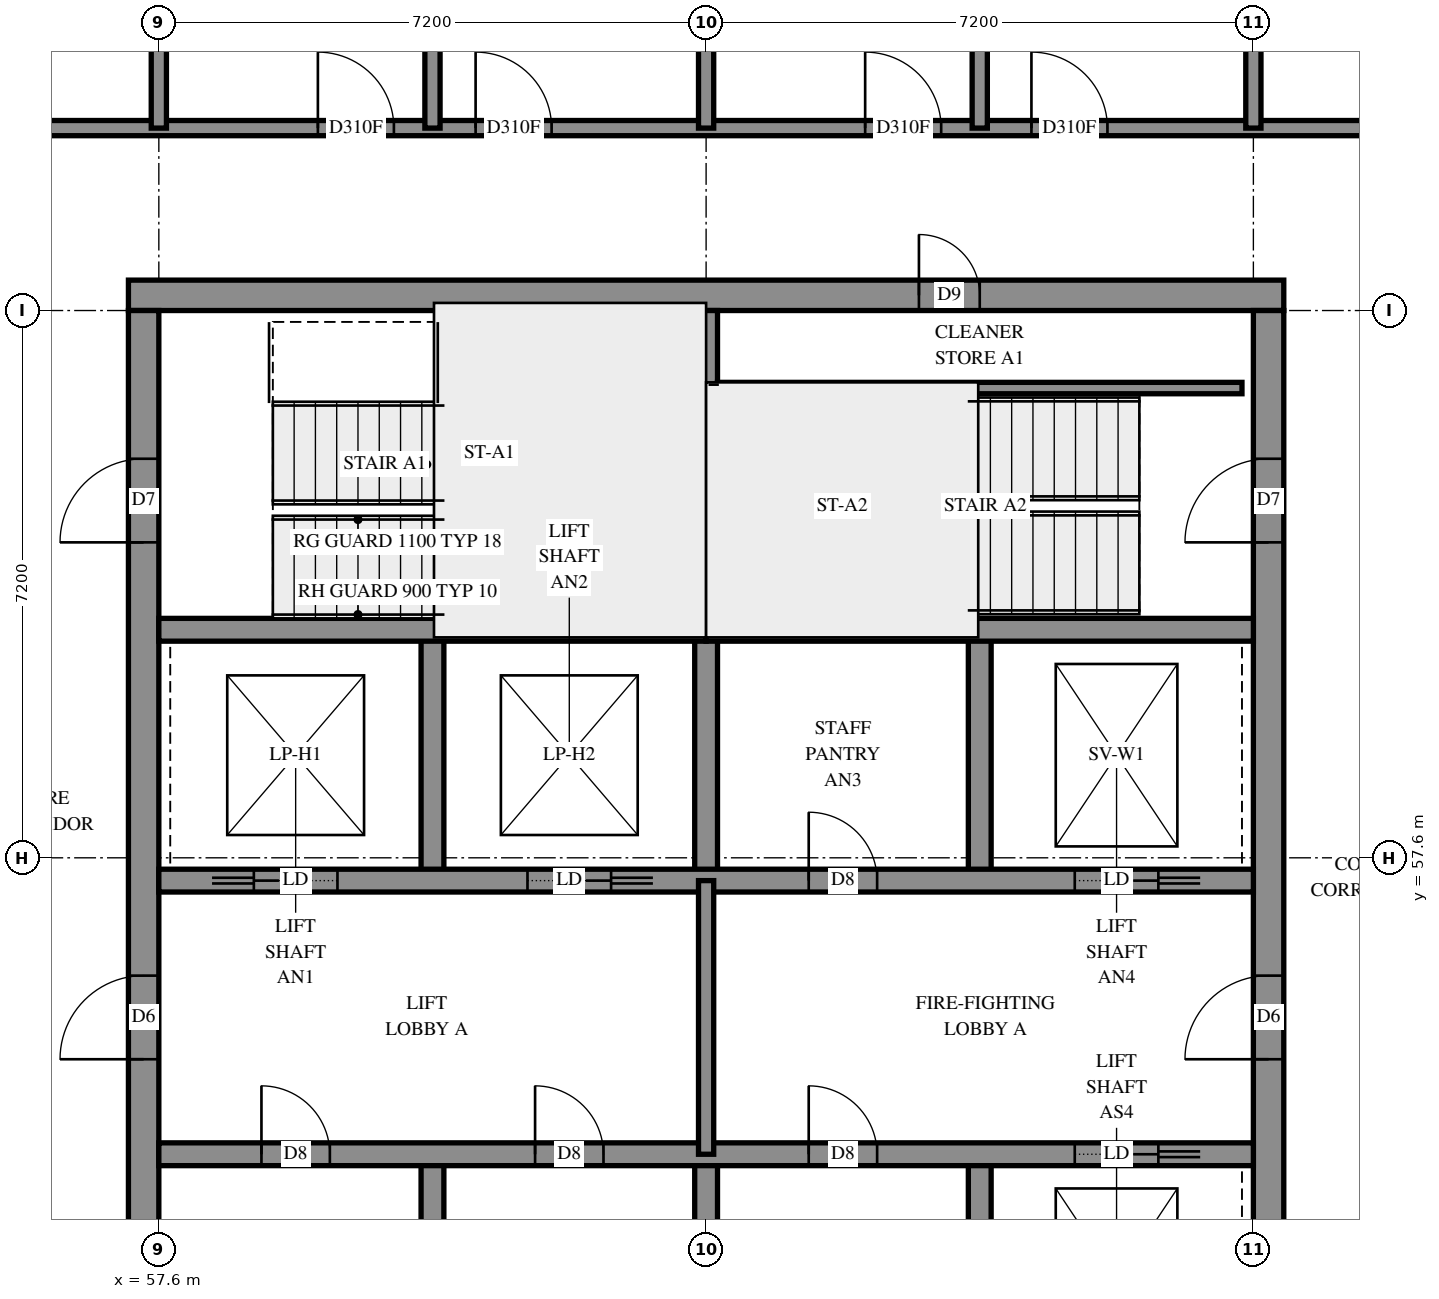
"""IFC4 building model, lengths in metres.
Left out: names, types, materials, properties, quantities, classifications, styles, units other than length and angle.
Written with IfcOpenShell. Run it as: python <this file> out.ifc"""

import sys

from ifc_helpers import new_model, si_unit, direction, frame, frame_2d, origin, place, context, subcontext, project, spatial, rectangle, extrude, element, fill, save


model = new_model("IFC4")
c1 = context("Model", 3, precision=1e-05, world=origin(), true_north=direction((0.0, 1.0)))
c2 = subcontext(c1, "Body", "Model", "MODEL_VIEW")
j1 = project(units=[si_unit("LENGTHUNIT", "METRE"), si_unit("PLANEANGLEUNIT", "RADIAN")], contexts=[c1])
p1 = place(None, origin())
s1 = spatial("IfcSite", under=j1, at=p1, CompositionType="ELEMENT")
p2 = place(p1, origin())
s2 = spatial("IfcBuilding", under=s1, at=p2, CompositionType="ELEMENT")
p3 = place(p2, frame((0.0, 0.0, 264.2)))
s3 = spatial("IfcBuildingStorey", under=s2, at=p3, CompositionType="ELEMENT", Elevation=264.2)
p4 = place(p3, frame((57.2, 65.0, -0.3), z_axis=(0.0, 0.0, 1.0), x_axis=(1.0, 0.0, 0.0)))
e1 = element("IfcWall", 1, at=p4, inside=s3, PredefinedType="SHEAR", context=c2, shape_type="SweptSolid", body=[
    extrude(rectangle(XDim=15.2, YDim=0.4, at=frame_2d((7.6, 0.0))), origin(), (0.0, 0.0, 1.0), 2.7),
])
p5 = place(p4, frame((10.4, 0.0, 0.3)))
e2 = element("IfcOpeningElement", 2, at=p5, cuts=e1, PredefinedType="OPENING", context=c2, shape_type="SweptSolid", body=[
    extrude(rectangle(XDim=0.8, YDim=2.1, at=frame_2d((0.4, 1.05))), frame((0.0, 0.21, 0.0), z_axis=(0.0, -1.0, 0.0), x_axis=(1.0, 0.0, 0.0)), (0.0, 0.0, 1.0), 0.42),
])
p6 = place(p3, frame((57.4, 50.4, -0.3), z_axis=(0.0, 0.0, 1.0), x_axis=(0.0, 1.0, 0.0)))
e3 = element("IfcWall", 3, at=p6, inside=s3, PredefinedType="SHEAR", context=c2, shape_type="SweptSolid", body=[
    extrude(rectangle(XDim=14.4, YDim=0.4, at=frame_2d((7.2, 0.0))), origin(), (0.0, 0.0, 1.0), 2.7),
])
p7 = place(p6, frame((4.55, 0.0, 0.3)))
e4 = element("IfcOpeningElement", 4, at=p7, cuts=e3, PredefinedType="OPENING", context=c2, shape_type="SweptSolid", body=[
    extrude(rectangle(XDim=1.1, YDim=2.1, at=frame_2d((0.55, 1.05))), frame((0.0, 0.21, 0.0), z_axis=(0.0, -1.0, 0.0), x_axis=(1.0, 0.0, 0.0)), (0.0, 0.0, 1.0), 0.42),
])
p8 = place(p6, frame((11.35, 0.0, 0.3)))
e5 = element("IfcOpeningElement", 5, at=p8, cuts=e3, PredefinedType="OPENING", context=c2, shape_type="SweptSolid", body=[
    extrude(rectangle(XDim=1.1, YDim=2.1, at=frame_2d((0.55, 1.05))), frame((0.0, 0.21, 0.0), z_axis=(0.0, -1.0, 0.0), x_axis=(1.0, 0.0, 0.0)), (0.0, 0.0, 1.0), 0.42),
])
p9 = place(p3, frame((72.2, 50.4, -0.3), z_axis=(0.0, 0.0, 1.0), x_axis=(0.0, 1.0, 0.0)))
e6 = element("IfcWall", 6, at=p9, inside=s3, PredefinedType="SHEAR", context=c2, shape_type="SweptSolid", body=[
    extrude(rectangle(XDim=14.4, YDim=0.4, at=frame_2d((7.2, 0.0))), origin(), (0.0, 0.0, 1.0), 2.7),
])
p10 = place(p9, frame((4.55, 0.0, 0.3)))
e7 = element("IfcOpeningElement", 7, at=p10, cuts=e6, PredefinedType="OPENING", context=c2, shape_type="SweptSolid", body=[
    extrude(rectangle(XDim=1.1, YDim=2.1, at=frame_2d((0.55, 1.05))), frame((0.0, 0.21, 0.0), z_axis=(0.0, -1.0, 0.0), x_axis=(1.0, 0.0, 0.0)), (0.0, 0.0, 1.0), 0.42),
])
p11 = place(p9, frame((11.35, 0.0, 0.3)))
e8 = element("IfcOpeningElement", 8, at=p11, cuts=e6, PredefinedType="OPENING", context=c2, shape_type="SweptSolid", body=[
    extrude(rectangle(XDim=1.1, YDim=2.1, at=frame_2d((0.55, 1.05))), frame((0.0, 0.21, 0.0), z_axis=(0.0, -1.0, 0.0), x_axis=(1.0, 0.0, 0.0)), (0.0, 0.0, 1.0), 0.42),
])
for number, where, z_axis, x_axis in (
    (9, (61.2, 50.4, 0.0), (0.0, 0.0, 1.0), (0.0, 1.0, 0.0)),
    (10, (61.2, 57.3, 0.0), (0.0, 0.0, 1.0), (0.0, 1.0, 0.0)),
    (11, (64.8, 50.4, 0.0), (0.0, 0.0, 1.0), (0.0, 1.0, 0.0)),
    (12, (64.8, 57.3, 0.0), (0.0, 0.0, 1.0), (0.0, 1.0, 0.0)),
    (13, (68.4, 50.4, 0.0), (0.0, 0.0, 1.0), (0.0, 1.0, 0.0)),
    (14, (68.4, 57.3, 0.0), (0.0, 0.0, 1.0), (0.0, 1.0, 0.0)),
):
    element("IfcWall", number, at=place(p3, frame(where, z_axis=z_axis, x_axis=x_axis)), inside=s3, PredefinedType="SOLIDWALL", context=c2, shape_type="SweptSolid", body=[
        extrude(rectangle(XDim=3.3, YDim=0.3, at=frame_2d((1.65, 0.0))), origin(), (0.0, 0.0, 1.0), 3.1),
    ])
p12 = place(p3, frame((57.6, 53.7, 0.0), z_axis=(0.0, 0.0, 1.0), x_axis=(1.0, 0.0, 0.0)))
e15 = element("IfcWall", 15, at=p12, inside=s3, PredefinedType="SOLIDWALL", context=c2, shape_type="SweptSolid", body=[
    extrude(rectangle(XDim=14.4, YDim=0.3, at=frame_2d((7.2, 0.0))), origin(), (0.0, 0.0, 1.0), 3.1),
])
p13 = place(p12, frame((1.35, 0.0, 0.0)))
e16 = element("IfcOpeningElement", 16, at=p13, cuts=e15, PredefinedType="OPENING", context=c2, shape_type="SweptSolid", body=[
    extrude(rectangle(XDim=0.9, YDim=2.1, at=frame_2d((0.45, 1.05))), frame((0.0, 0.16, 0.0), z_axis=(0.0, -1.0, 0.0), x_axis=(1.0, 0.0, 0.0)), (0.0, 0.0, 1.0), 0.32),
])
p14 = place(p12, frame((4.95, 0.0, 0.0)))
e17 = element("IfcOpeningElement", 17, at=p14, cuts=e15, PredefinedType="OPENING", context=c2, shape_type="SweptSolid", body=[
    extrude(rectangle(XDim=0.9, YDim=2.1, at=frame_2d((0.45, 1.05))), frame((0.0, 0.16, 0.0), z_axis=(0.0, -1.0, 0.0), x_axis=(1.0, 0.0, 0.0)), (0.0, 0.0, 1.0), 0.32),
])
p15 = place(p12, frame((8.55, 0.0, 0.0)))
e18 = element("IfcOpeningElement", 18, at=p15, cuts=e15, PredefinedType="OPENING", context=c2, shape_type="SweptSolid", body=[
    extrude(rectangle(XDim=0.9, YDim=2.1, at=frame_2d((0.45, 1.05))), frame((0.0, 0.16, 0.0), z_axis=(0.0, -1.0, 0.0), x_axis=(1.0, 0.0, 0.0)), (0.0, 0.0, 1.0), 0.32),
])
p16 = place(p12, frame((12.05, 0.0, 0.0)))
e19 = element("IfcOpeningElement", 19, at=p16, cuts=e15, PredefinedType="OPENING", context=c2, shape_type="SweptSolid", body=[
    extrude(rectangle(XDim=1.1, YDim=2.1, at=frame_2d((0.55, 1.05))), frame((0.0, 0.16, 0.0), z_axis=(0.0, -1.0, 0.0), x_axis=(1.0, 0.0, 0.0)), (0.0, 0.0, 1.0), 0.32),
])
p17 = place(p3, frame((57.6, 57.3, 0.0), z_axis=(0.0, 0.0, 1.0), x_axis=(1.0, 0.0, 0.0)))
e20 = element("IfcWall", 20, at=p17, inside=s3, PredefinedType="SOLIDWALL", context=c2, shape_type="SweptSolid", body=[
    extrude(rectangle(XDim=14.4, YDim=0.3, at=frame_2d((7.2, 0.0))), origin(), (0.0, 0.0, 1.0), 3.1),
])
p18 = place(p17, frame((8.55, 0.0, 0.0)))
e21 = element("IfcOpeningElement", 21, at=p18, cuts=e20, PredefinedType="OPENING", context=c2, shape_type="SweptSolid", body=[
    extrude(rectangle(XDim=0.9, YDim=2.1, at=frame_2d((0.45, 1.05))), frame((0.0, 0.16, 0.0), z_axis=(0.0, -1.0, 0.0), x_axis=(1.0, 0.0, 0.0)), (0.0, 0.0, 1.0), 0.32),
])
p19 = place(p17, frame((1.25, 0.0, 0.0)))
e22 = element("IfcOpeningElement", 22, at=p19, cuts=e20, PredefinedType="OPENING", context=c2, shape_type="SweptSolid", body=[
    extrude(rectangle(XDim=1.1, YDim=2.1, at=frame_2d((0.55, 1.05))), frame((0.0, 0.16, 0.0), z_axis=(0.0, -1.0, 0.0), x_axis=(1.0, 0.0, 0.0)), (0.0, 0.0, 1.0), 0.32),
])
p20 = place(p17, frame((4.85, 0.0, 0.0)))
e23 = element("IfcOpeningElement", 23, at=p20, cuts=e20, PredefinedType="OPENING", context=c2, shape_type="SweptSolid", body=[
    extrude(rectangle(XDim=1.1, YDim=2.1, at=frame_2d((0.55, 1.05))), frame((0.0, 0.16, 0.0), z_axis=(0.0, -1.0, 0.0), x_axis=(1.0, 0.0, 0.0)), (0.0, 0.0, 1.0), 0.32),
])
p21 = place(p17, frame((12.05, 0.0, 0.0)))
e24 = element("IfcOpeningElement", 24, at=p21, cuts=e20, PredefinedType="OPENING", context=c2, shape_type="SweptSolid", body=[
    extrude(rectangle(XDim=1.1, YDim=2.1, at=frame_2d((0.55, 1.05))), frame((0.0, 0.16, 0.0), z_axis=(0.0, -1.0, 0.0), x_axis=(1.0, 0.0, 0.0)), (0.0, 0.0, 1.0), 0.32),
])
for number, where, z_axis, x_axis in (
    (25, (57.6, 60.6, 0.0), (0.0, 0.0, 1.0), (1.0, 0.0, 0.0)),
    (26, (64.8, 60.6, 0.0), (0.0, 0.0, 1.0), (1.0, 0.0, 0.0)),
):
    element("IfcWall", number, at=place(p3, frame(where, z_axis=z_axis, x_axis=x_axis)), inside=s3, PredefinedType="SOLIDWALL", context=c2, shape_type="SweptSolid", body=[
        extrude(rectangle(XDim=7.2, YDim=0.3, at=frame_2d((3.6, 0.0))), origin(), (0.0, 0.0, 1.0), 3.1),
    ])
p22 = place(p3, frame((64.8, 60.6, 0.0), z_axis=(0.0, 0.0, 1.0), x_axis=(0.0, 1.0, 0.0)))
e27 = element("IfcWall", 27, at=p22, inside=s3, PredefinedType="SOLIDWALL", context=c2, shape_type="SweptSolid", body=[
    extrude(rectangle(XDim=4.2, YDim=0.3, at=frame_2d((2.1, 0.0))), origin(), (0.0, 0.0, 1.0), 3.1),
])
p23 = place(p3, frame((64.95, 63.78, 0.0), z_axis=(0.0, 0.0, 1.0), x_axis=(1.0, 0.0, 0.0)))
e28 = element("IfcWall", 28, at=p23, inside=s3, PredefinedType="PARTITIONING", context=c2, shape_type="SweptSolid", body=[
    extrude(rectangle(XDim=6.9, YDim=0.15, at=frame_2d((3.45, 0.0))), origin(), (0.0, 0.0, 1.0), 3.1),
])
p24 = place(p3, frame((64.8, 53.7, 0.0), z_axis=(0.0, 0.0, 1.0), x_axis=(0.0, 1.0, 0.0)))
e29 = element("IfcWall", 29, at=p24, inside=s3, PredefinedType="PARTITIONING", context=c2, shape_type="SweptSolid", body=[
    extrude(rectangle(XDim=3.6, YDim=0.2, at=frame_2d((1.8, 0.0))), origin(), (0.0, 0.0, 1.0), 3.1),
])
p25 = place(p3, frame((55.2, 67.2, 0.0), z_axis=(0.0, 0.0, 1.0), x_axis=(1.0, 0.0, 0.0)))
e30 = element("IfcWall", 30, at=p25, inside=s3, PredefinedType="PARTITIONING", context=c2, shape_type="SweptSolid", body=[
    extrude(rectangle(XDim=19.2, YDim=0.2, at=frame_2d((9.6, 0.0))), origin(), (0.0, 0.0, 1.0), 3.1),
])
p26 = place(p25, frame((4.492, 0.0, 0.0)))
e31 = element("IfcOpeningElement", 31, at=p26, cuts=e30, PredefinedType="OPENING", context=c2, shape_type="SweptSolid", body=[
    extrude(rectangle(XDim=1.0, YDim=2.1, at=frame_2d((0.5, 1.05))), frame((0.0, 0.11, 0.0), z_axis=(0.0, -1.0, 0.0), x_axis=(1.0, 0.0, 0.0)), (0.0, 0.0, 1.0), 0.22),
])
p27 = place(p25, frame((6.567, 0.0, 0.0)))
e32 = element("IfcOpeningElement", 32, at=p27, cuts=e30, PredefinedType="OPENING", context=c2, shape_type="SweptSolid", body=[
    extrude(rectangle(XDim=1.0, YDim=2.1, at=frame_2d((0.5, 1.05))), frame((0.0, 0.11, 0.0), z_axis=(0.0, -1.0, 0.0), x_axis=(1.0, 0.0, 0.0)), (0.0, 0.0, 1.0), 0.22),
])
p28 = place(p25, frame((11.693, 0.0, 0.0)))
e33 = element("IfcOpeningElement", 33, at=p28, cuts=e30, PredefinedType="OPENING", context=c2, shape_type="SweptSolid", body=[
    extrude(rectangle(XDim=1.0, YDim=2.1, at=frame_2d((0.5, 1.05))), frame((0.0, 0.11, 0.0), z_axis=(0.0, -1.0, 0.0), x_axis=(1.0, 0.0, 0.0)), (0.0, 0.0, 1.0), 0.22),
])
p29 = place(p25, frame((13.88, 0.0, 0.0)))
e34 = element("IfcOpeningElement", 34, at=p29, cuts=e30, PredefinedType="OPENING", context=c2, shape_type="SweptSolid", body=[
    extrude(rectangle(XDim=1.0, YDim=2.1, at=frame_2d((0.5, 1.05))), frame((0.0, 0.11, 0.0), z_axis=(0.0, -1.0, 0.0), x_axis=(1.0, 0.0, 0.0)), (0.0, 0.0, 1.0), 0.22),
])
p30 = place(p3, frame((68.4, 67.2, 0.0), z_axis=(0.0, 0.0, 1.0), x_axis=(0.0, 1.0, 0.0)))
e35 = element("IfcWall", 35, at=p30, inside=s3, PredefinedType="PARTITIONING", context=c2, shape_type="SweptSolid", body=[
    extrude(rectangle(XDim=5.578, YDim=0.2, at=frame_2d((2.789, 0.0))), origin(), (0.0, 0.0, 1.0), 3.1),
])
p31 = place(p3, frame((61.2, 67.2, 0.0), z_axis=(0.0, 0.0, 1.0), x_axis=(0.0, 1.0, 0.0)))
e36 = element("IfcWall", 36, at=p31, inside=s3, PredefinedType="PARTITIONING", context=c2, shape_type="SweptSolid", body=[
    extrude(rectangle(XDim=5.572, YDim=0.2, at=frame_2d((2.786, 0.0))), origin(), (0.0, 0.0, 1.0), 3.1),
])
for number, where, z_axis, x_axis in (
    (37, (57.6, 67.2, 0.0), (0.0, 0.0, 1.0), (0.0, 1.0, 0.0)),
    (38, (64.8, 67.2, 0.0), (0.0, 0.0, 1.0), (0.0, 1.0, 0.0)),
):
    element("IfcWall", number, at=place(p3, frame(where, z_axis=z_axis, x_axis=x_axis)), inside=s3, PredefinedType="PARTITIONING", context=c2, shape_type="SweptSolid", body=[
        extrude(rectangle(XDim=4.45, YDim=0.2, at=frame_2d((2.225, 0.0))), origin(), (0.0, 0.0, 1.0), 3.1),
    ])
p32 = place(p3, frame((72.0, 67.2, 0.0), z_axis=(0.0, 0.0, 1.0), x_axis=(0.0, 1.0, 0.0)))
e39 = element("IfcWall", 39, at=p32, inside=s3, PredefinedType="PARTITIONING", context=c2, shape_type="SweptSolid", body=[
    extrude(rectangle(XDim=4.346, YDim=0.2, at=frame_2d((2.173, 0.0))), origin(), (0.0, 0.0, 1.0), 3.1),
])
p33 = place(p5, origin())
e40 = element("IfcDoor", 40, at=p33, inside=s3, OperationType="SINGLE_SWING_RIGHT", PredefinedType="DOOR", context=c2, shape_type="SweptSolid", body=[
    extrude(rectangle(XDim=0.8, YDim=2.1, at=frame_2d((0.4, 1.05))), frame((0.0, 0.025, 0.0), z_axis=(0.0, -1.0, 0.0), x_axis=(1.0, 0.0, 0.0)), (0.0, 0.0, 1.0), 0.05),
])
fill(e2, e40)
p34 = place(p7, origin())
e41 = element("IfcDoor", 41, at=p34, inside=s3, OperationType="DOUBLE_DOOR_SINGLE_SWING", PredefinedType="DOOR", context=c2, shape_type="SweptSolid", body=[
    extrude(rectangle(XDim=1.1, YDim=2.1, at=frame_2d((0.55, 1.05))), frame((0.0, 0.025, 0.0), z_axis=(0.0, -1.0, 0.0), x_axis=(1.0, 0.0, 0.0)), (0.0, 0.0, 1.0), 0.05),
])
fill(e4, e41)
p35 = place(p10, origin())
e42 = element("IfcDoor", 42, at=p35, inside=s3, OperationType="DOUBLE_DOOR_SINGLE_SWING", PredefinedType="DOOR", context=c2, shape_type="SweptSolid", body=[
    extrude(rectangle(XDim=1.1, YDim=2.1, at=frame_2d((0.55, 1.05))), frame((0.0, 0.025, 0.0), z_axis=(0.0, -1.0, 0.0), x_axis=(1.0, 0.0, 0.0)), (0.0, 0.0, 1.0), 0.05),
])
fill(e7, e42)
p36 = place(p8, origin())
e43 = element("IfcDoor", 43, at=p36, inside=s3, OperationType="SINGLE_SWING_LEFT", PredefinedType="DOOR", context=c2, shape_type="SweptSolid", body=[
    extrude(rectangle(XDim=1.1, YDim=2.1, at=frame_2d((0.55, 1.05))), frame((0.0, 0.025, 0.0), z_axis=(0.0, -1.0, 0.0), x_axis=(1.0, 0.0, 0.0)), (0.0, 0.0, 1.0), 0.05),
])
fill(e5, e43)
p37 = place(p11, origin())
e44 = element("IfcDoor", 44, at=p37, inside=s3, OperationType="SINGLE_SWING_RIGHT", PredefinedType="DOOR", context=c2, shape_type="SweptSolid", body=[
    extrude(rectangle(XDim=1.1, YDim=2.1, at=frame_2d((0.55, 1.05))), frame((0.0, 0.025, 0.0), z_axis=(0.0, -1.0, 0.0), x_axis=(1.0, 0.0, 0.0)), (0.0, 0.0, 1.0), 0.05),
])
fill(e8, e44)
p38 = place(p13, origin())
e45 = element("IfcDoor", 45, at=p38, inside=s3, OperationType="SINGLE_SWING_LEFT", PredefinedType="DOOR", context=c2, shape_type="SweptSolid", body=[
    extrude(rectangle(XDim=0.9, YDim=2.1, at=frame_2d((0.45, 1.05))), frame((0.0, 0.025, 0.0), z_axis=(0.0, -1.0, 0.0), x_axis=(1.0, 0.0, 0.0)), (0.0, 0.0, 1.0), 0.05),
])
fill(e16, e45)
p39 = place(p14, origin())
e46 = element("IfcDoor", 46, at=p39, inside=s3, OperationType="SINGLE_SWING_LEFT", PredefinedType="DOOR", context=c2, shape_type="SweptSolid", body=[
    extrude(rectangle(XDim=0.9, YDim=2.1, at=frame_2d((0.45, 1.05))), frame((0.0, 0.025, 0.0), z_axis=(0.0, -1.0, 0.0), x_axis=(1.0, 0.0, 0.0)), (0.0, 0.0, 1.0), 0.05),
])
fill(e17, e46)
p40 = place(p15, origin())
e47 = element("IfcDoor", 47, at=p40, inside=s3, OperationType="SINGLE_SWING_LEFT", PredefinedType="DOOR", context=c2, shape_type="SweptSolid", body=[
    extrude(rectangle(XDim=0.9, YDim=2.1, at=frame_2d((0.45, 1.05))), frame((0.0, 0.025, 0.0), z_axis=(0.0, -1.0, 0.0), x_axis=(1.0, 0.0, 0.0)), (0.0, 0.0, 1.0), 0.05),
])
fill(e18, e47)
p41 = place(p18, origin())
e48 = element("IfcDoor", 48, at=p41, inside=s3, OperationType="SINGLE_SWING_LEFT", PredefinedType="DOOR", context=c2, shape_type="SweptSolid", body=[
    extrude(rectangle(XDim=0.9, YDim=2.1, at=frame_2d((0.45, 1.05))), frame((0.0, 0.025, 0.0), z_axis=(0.0, -1.0, 0.0), x_axis=(1.0, 0.0, 0.0)), (0.0, 0.0, 1.0), 0.05),
])
fill(e21, e48)
p42 = place(p16, origin())
e49 = element("IfcDoor", 49, at=p42, inside=s3, OperationType="SLIDING_TO_RIGHT", PredefinedType="DOOR", context=c2, shape_type="SweptSolid", body=[
    extrude(rectangle(XDim=1.1, YDim=2.1, at=frame_2d((0.55, 1.05))), frame((0.0, 0.025, 0.0), z_axis=(0.0, -1.0, 0.0), x_axis=(1.0, 0.0, 0.0)), (0.0, 0.0, 1.0), 0.05),
])
fill(e19, e49)
p43 = place(p19, origin())
e50 = element("IfcDoor", 50, at=p43, inside=s3, OperationType="SLIDING_TO_LEFT", PredefinedType="DOOR", context=c2, shape_type="SweptSolid", body=[
    extrude(rectangle(XDim=1.1, YDim=2.1, at=frame_2d((0.55, 1.05))), frame((0.0, 0.025, 0.0), z_axis=(0.0, -1.0, 0.0), x_axis=(1.0, 0.0, 0.0)), (0.0, 0.0, 1.0), 0.05),
])
fill(e22, e50)
p44 = place(p20, origin())
e51 = element("IfcDoor", 51, at=p44, inside=s3, OperationType="SLIDING_TO_RIGHT", PredefinedType="DOOR", context=c2, shape_type="SweptSolid", body=[
    extrude(rectangle(XDim=1.1, YDim=2.1, at=frame_2d((0.55, 1.05))), frame((0.0, 0.025, 0.0), z_axis=(0.0, -1.0, 0.0), x_axis=(1.0, 0.0, 0.0)), (0.0, 0.0, 1.0), 0.05),
])
fill(e23, e51)
p45 = place(p21, origin())
e52 = element("IfcDoor", 52, at=p45, inside=s3, OperationType="SLIDING_TO_RIGHT", PredefinedType="DOOR", context=c2, shape_type="SweptSolid", body=[
    extrude(rectangle(XDim=1.1, YDim=2.1, at=frame_2d((0.55, 1.05))), frame((0.0, 0.025, 0.0), z_axis=(0.0, -1.0, 0.0), x_axis=(1.0, 0.0, 0.0)), (0.0, 0.0, 1.0), 0.05),
])
fill(e24, e52)
p46 = place(p26, origin())
e53 = element("IfcDoor", 53, at=p46, inside=s3, OperationType="SINGLE_SWING_RIGHT", PredefinedType="DOOR", context=c2, shape_type="SweptSolid", body=[
    extrude(rectangle(XDim=1.0, YDim=2.1, at=frame_2d((0.5, 1.05))), frame((0.0, 0.025, 0.0), z_axis=(0.0, -1.0, 0.0), x_axis=(1.0, 0.0, 0.0)), (0.0, 0.0, 1.0), 0.05),
])
fill(e31, e53)
p47 = place(p27, origin())
e54 = element("IfcDoor", 54, at=p47, inside=s3, OperationType="SINGLE_SWING_LEFT", PredefinedType="DOOR", context=c2, shape_type="SweptSolid", body=[
    extrude(rectangle(XDim=1.0, YDim=2.1, at=frame_2d((0.5, 1.05))), frame((0.0, 0.025, 0.0), z_axis=(0.0, -1.0, 0.0), x_axis=(1.0, 0.0, 0.0)), (0.0, 0.0, 1.0), 0.05),
])
fill(e32, e54)
p48 = place(p28, origin())
e55 = element("IfcDoor", 55, at=p48, inside=s3, OperationType="SINGLE_SWING_RIGHT", PredefinedType="DOOR", context=c2, shape_type="SweptSolid", body=[
    extrude(rectangle(XDim=1.0, YDim=2.1, at=frame_2d((0.5, 1.05))), frame((0.0, 0.025, 0.0), z_axis=(0.0, -1.0, 0.0), x_axis=(1.0, 0.0, 0.0)), (0.0, 0.0, 1.0), 0.05),
])
fill(e33, e55)
p49 = place(p29, origin())
e56 = element("IfcDoor", 56, at=p49, inside=s3, OperationType="SINGLE_SWING_LEFT", PredefinedType="DOOR", context=c2, shape_type="SweptSolid", body=[
    extrude(rectangle(XDim=1.0, YDim=2.1, at=frame_2d((0.5, 1.05))), frame((0.0, 0.025, 0.0), z_axis=(0.0, -1.0, 0.0), x_axis=(1.0, 0.0, 0.0)), (0.0, 0.0, 1.0), 0.05),
])
fill(e34, e56)
save(model, sys.argv[1])
